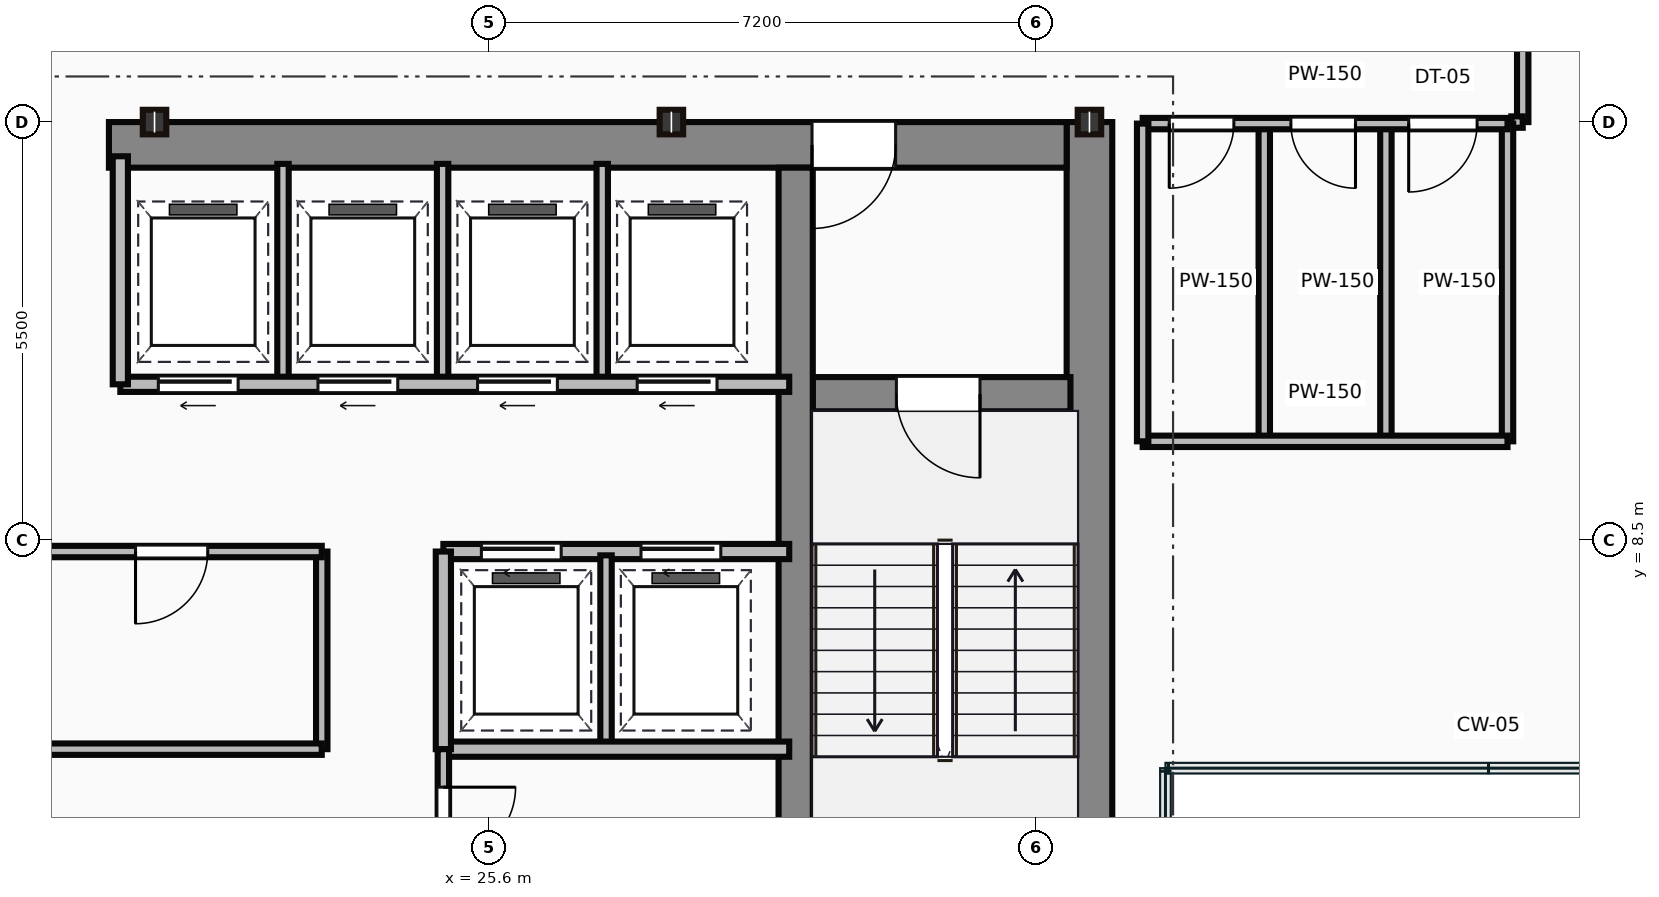
"""IFC4 building model, lengths in metres.
Left out: names, types, materials, properties, quantities, classifications, styles, units other than length and angle.
Written with IfcOpenShell. Run it as: python <this file> out.ifc"""

import sys

from ifc_helpers import new_model, si_unit, direction, frame, frame_2d, origin, origin_2d, place, context, subcontext, project, spatial, rectangle, i_section, extrude, source, transform, mapped, element, fill, save


model = new_model("IFC4")
c1 = context("Model", 3, precision=1e-05, world=origin(), true_north=direction((0.0, 1.0)))
c2 = subcontext(c1, "Body", "Model", "MODEL_VIEW")
j1 = project(units=[si_unit("LENGTHUNIT", "METRE"), si_unit("PLANEANGLEUNIT", "RADIAN")], contexts=[c1])
p1 = place(None, origin())
s1 = spatial("IfcSite", under=j1, at=p1, CompositionType="ELEMENT")
p2 = place(p1, origin())
s2 = spatial("IfcBuilding", under=s1, at=p2, CompositionType="ELEMENT")
p3 = place(p2, frame((0.0, 0.0, 280.7)))
s3 = spatial("IfcBuildingStorey", under=s2, at=p3, CompositionType="ELEMENT", Elevation=280.7)
m1 = source(origin(), c2, "Body", "SweptSolid", [
    extrude(rectangle(XDim=13.1, YDim=0.6, at=frame_2d((6.55, 0.0))), origin(), (0.0, 0.0, 1.0), 3.65),
])
p4 = place(p3, frame((33.5, 0.9, 0.0), z_axis=(0.0, 0.0, 1.0), x_axis=(0.0, 1.0, 0.0)))
e1 = element("IfcWall", 1, at=p4, inside=s3, PredefinedType="SHEAR", context=c2, shape_type="MappedRepresentation", body=[
    mapped(m1, transform((0.0, 0.0, 0.0))),
])
m2 = source(origin(), c2, "Body", "SweptSolid", [
    extrude(rectangle(XDim=12.6, YDim=0.6, at=frame_2d((6.3, 0.0))), origin(), (0.0, 0.0, 1.0), 3.65),
])
p5 = place(p3, frame((20.6, 13.7, 0.0), z_axis=(0.0, 0.0, 1.0), x_axis=(1.0, 0.0, 0.0)))
e2 = element("IfcWall", 2, at=p5, inside=s3, PredefinedType="SHEAR", context=c2, shape_type="MappedRepresentation", body=[
    mapped(m2, transform((0.0, 0.0, 0.0))),
])
p6 = place(p5, frame((9.25, 0.0, 0.0)))
e3 = element("IfcOpeningElement", 3, at=p6, cuts=e2, PredefinedType="OPENING", context=c2, shape_type="SweptSolid", body=[
    extrude(rectangle(XDim=1.1, YDim=2.15, at=frame_2d((0.55, 1.075))), frame((0.0, 0.31, 0.0), z_axis=(0.0, -1.0, 0.0), x_axis=(1.0, 0.0, 0.0)), (0.0, 0.0, 1.0), 0.62),
])
m3 = source(origin(), c2, "Body", "SweptSolid", [
    extrude(rectangle(XDim=12.5, YDim=0.45, at=frame_2d((6.25, 0.0))), origin(), (0.0, 0.0, 1.0), 3.65),
])
p7 = place(p3, frame((29.635, 0.9, 0.0), z_axis=(0.0, 0.0, 1.0), x_axis=(0.0, 1.0, 0.0)))
e4 = element("IfcWall", 4, at=p7, inside=s3, PredefinedType="SHEAR", context=c2, shape_type="MappedRepresentation", body=[
    mapped(m3, transform((0.0, 0.0, 0.0))),
])
m4 = source(origin(), c2, "Body", "SweptSolid", [
    extrude(rectangle(XDim=3.39, YDim=0.45, at=frame_2d((1.695, 0.0))), origin(), (0.0, 0.0, 1.0), 3.65),
])
p8 = place(p3, frame((29.86, 10.42, 0.0), z_axis=(0.0, 0.0, 1.0), x_axis=(1.0, 0.0, 0.0)))
e5 = element("IfcWall", 5, at=p8, inside=s3, PredefinedType="SHEAR", context=c2, shape_type="MappedRepresentation", body=[
    mapped(m4, transform((0.0, 0.0, 0.0))),
])
p9 = place(p8, frame((1.1, 0.0, 0.0)))
e6 = element("IfcOpeningElement", 6, at=p9, cuts=e5, PredefinedType="OPENING", context=c2, shape_type="SweptSolid", body=[
    extrude(rectangle(XDim=1.1, YDim=2.15, at=frame_2d((0.55, 1.075))), frame((0.0, 0.235, 0.0), z_axis=(0.0, -1.0, 0.0), x_axis=(1.0, 0.0, 0.0)), (0.0, 0.0, 1.0), 0.47),
])
m5 = source(origin(), c2, "Body", "SweptSolid", [
    extrude(i_section(OverallWidth=0.309, OverallDepth=0.323, WebThickness=0.014, FlangeThickness=0.023, at=origin_2d()), origin(), (0.0, 0.0, 1.0), 3.65),
])
for number, where, z_axis, x_axis in (
    (7, (21.2, 14.0, 0.0), (0.0, 0.0, 1.0), (1.0, 0.0, 0.0)),
    (8, (28.0, 14.0, 0.0), (0.0, 0.0, 1.0), (1.0, 0.0, 0.0)),
    (9, (33.5, 14.0, 0.0), (0.0, 0.0, 1.0), (1.0, 0.0, 0.0)),
):
    element("IfcColumn", number, at=place(p3, frame(where, z_axis=z_axis, x_axis=x_axis)), inside=s3, PredefinedType="COLUMN", context=c2, shape_type="MappedRepresentation", body=[
        mapped(m5, transform((0.0, 0.0, 0.0))),
    ])
m6 = source(origin(), c2, "Body", "SweptSolid", [
    extrude(rectangle(XDim=11.85, YDim=0.15, at=frame_2d((5.925, 0.0))), origin(), (0.0, 0.0, 1.0), 3.4),
])
p10 = place(p3, frame((11.55, 5.75, 0.0), z_axis=(0.0, 0.0, 1.0), x_axis=(1.0, 0.0, 0.0)))
e10 = element("IfcWall", 10, at=p10, inside=s3, PredefinedType="PARTITIONING", context=c2, shape_type="MappedRepresentation", body=[
    mapped(m6, transform((0.0, 0.0, 0.0))),
])
p11 = place(p3, frame((11.55, 8.35, 0.0), z_axis=(0.0, 0.0, 1.0), x_axis=(1.0, 0.0, 0.0)))
e11 = element("IfcWall", 11, at=p11, inside=s3, PredefinedType="PARTITIONING", context=c2, shape_type="MappedRepresentation", body=[
    mapped(m6, transform((0.0, 0.0, 0.0))),
])
p12 = place(p11, frame((1.1, 0.0, 0.0)))
e12 = element("IfcOpeningElement", 12, at=p12, cuts=e11, PredefinedType="OPENING", context=c2, shape_type="SweptSolid", body=[
    extrude(rectangle(XDim=0.95, YDim=2.15, at=frame_2d((0.475, 1.075))), frame((0.0, 0.085, 0.0), z_axis=(0.0, -1.0, 0.0), x_axis=(1.0, 0.0, 0.0)), (0.0, 0.0, 1.0), 0.17),
])
p13 = place(p11, frame((9.4, 0.0, 0.0)))
e13 = element("IfcOpeningElement", 13, at=p13, cuts=e11, PredefinedType="OPENING", context=c2, shape_type="SweptSolid", body=[
    extrude(rectangle(XDim=0.95, YDim=2.15, at=frame_2d((0.475, 1.075))), frame((0.0, 0.085, 0.0), z_axis=(0.0, -1.0, 0.0), x_axis=(1.0, 0.0, 0.0)), (0.0, 0.0, 1.0), 0.17),
])
m7 = source(origin(), c2, "Body", "SweptSolid", [
    extrude(rectangle(XDim=2.6, YDim=0.15, at=frame_2d((1.3, 0.0))), origin(), (0.0, 0.0, 1.0), 3.4),
])
p14 = place(p3, frame((23.4, 5.75, 0.0), z_axis=(0.0, 0.0, 1.0), x_axis=(0.0, 1.0, 0.0)))
e14 = element("IfcWall", 14, at=p14, inside=s3, PredefinedType="PARTITIONING", context=c2, shape_type="MappedRepresentation", body=[
    mapped(m7, transform((0.0, 0.0, 0.0))),
])
m8 = source(origin(), c2, "Body", "SweptSolid", [
    extrude(rectangle(XDim=8.8, YDim=0.2, at=frame_2d((4.4, 0.0))), origin(), (0.0, 0.0, 1.0), 3.4),
])
p15 = place(p3, frame((20.75, 10.55, 0.0), z_axis=(0.0, 0.0, 1.0), x_axis=(1.0, 0.0, 0.0)))
e15 = element("IfcWall", 15, at=p15, inside=s3, PredefinedType="PARTITIONING", context=c2, shape_type="MappedRepresentation", body=[
    mapped(m8, transform((0.0, 0.0, 0.0))),
])
p16 = place(p15, frame((0.5, 0.0, 0.0)))
e16 = element("IfcOpeningElement", 16, at=p16, cuts=e15, PredefinedType="OPENING", context=c2, shape_type="SweptSolid", body=[
    extrude(rectangle(XDim=1.05, YDim=2.15, at=frame_2d((0.525, 1.075))), frame((0.0, 0.11, 0.0), z_axis=(0.0, -1.0, 0.0), x_axis=(1.0, 0.0, 0.0)), (0.0, 0.0, 1.0), 0.22),
])
p17 = place(p15, frame((2.6, 0.0, 0.0)))
e17 = element("IfcOpeningElement", 17, at=p17, cuts=e15, PredefinedType="OPENING", context=c2, shape_type="SweptSolid", body=[
    extrude(rectangle(XDim=1.05, YDim=2.15, at=frame_2d((0.525, 1.075))), frame((0.0, 0.11, 0.0), z_axis=(0.0, -1.0, 0.0), x_axis=(1.0, 0.0, 0.0)), (0.0, 0.0, 1.0), 0.22),
])
p18 = place(p15, frame((4.7, 0.0, 0.0)))
e18 = element("IfcOpeningElement", 18, at=p18, cuts=e15, PredefinedType="OPENING", context=c2, shape_type="SweptSolid", body=[
    extrude(rectangle(XDim=1.05, YDim=2.15, at=frame_2d((0.525, 1.075))), frame((0.0, 0.11, 0.0), z_axis=(0.0, -1.0, 0.0), x_axis=(1.0, 0.0, 0.0)), (0.0, 0.0, 1.0), 0.22),
])
p19 = place(p15, frame((6.8, 0.0, 0.0)))
e19 = element("IfcOpeningElement", 19, at=p19, cuts=e15, PredefinedType="OPENING", context=c2, shape_type="SweptSolid", body=[
    extrude(rectangle(XDim=1.05, YDim=2.15, at=frame_2d((0.525, 1.075))), frame((0.0, 0.11, 0.0), z_axis=(0.0, -1.0, 0.0), x_axis=(1.0, 0.0, 0.0)), (0.0, 0.0, 1.0), 0.22),
])
m9 = source(origin(), c2, "Body", "SweptSolid", [
    extrude(rectangle(XDim=3.0, YDim=0.2, at=frame_2d((1.5, 0.0))), origin(), (0.0, 0.0, 1.0), 3.4),
])
p20 = place(p3, frame((20.75, 10.55, 0.0), z_axis=(0.0, 0.0, 1.0), x_axis=(0.0, 1.0, 0.0)))
e20 = element("IfcWall", 20, at=p20, inside=s3, PredefinedType="PARTITIONING", context=c2, shape_type="MappedRepresentation", body=[
    mapped(m9, transform((0.0, 0.0, 0.0))),
])
m10 = source(origin(), c2, "Body", "SweptSolid", [
    extrude(rectangle(XDim=2.85, YDim=0.15, at=frame_2d((1.425, 0.0))), origin(), (0.0, 0.0, 1.0), 3.4),
])
for number, where, z_axis, x_axis in (
    (21, (22.89, 10.6, 0.0), (0.0, 0.0, 1.0), (0.0, 1.0, 0.0)),
    (22, (24.99, 10.6, 0.0), (0.0, 0.0, 1.0), (0.0, 1.0, 0.0)),
    (23, (27.09, 10.6, 0.0), (0.0, 0.0, 1.0), (0.0, 1.0, 0.0)),
):
    element("IfcWall", number, at=place(p3, frame(where, z_axis=z_axis, x_axis=x_axis)), inside=s3, PredefinedType="PARTITIONING", context=c2, shape_type="MappedRepresentation", body=[
        mapped(m10, transform((0.0, 0.0, 0.0))),
    ])
m11 = source(origin(), c2, "Body", "SweptSolid", [
    extrude(rectangle(XDim=4.55, YDim=0.2, at=frame_2d((2.275, 0.0))), origin(), (0.0, 0.0, 1.0), 3.4),
])
p21 = place(p3, frame((25.0, 8.35, 0.0), z_axis=(0.0, 0.0, 1.0), x_axis=(1.0, 0.0, 0.0)))
e24 = element("IfcWall", 24, at=p21, inside=s3, PredefinedType="PARTITIONING", context=c2, shape_type="MappedRepresentation", body=[
    mapped(m11, transform((0.0, 0.0, 0.0))),
])
p22 = place(p21, frame((0.5, 0.0, 0.0)))
e25 = element("IfcOpeningElement", 25, at=p22, cuts=e24, PredefinedType="OPENING", context=c2, shape_type="SweptSolid", body=[
    extrude(rectangle(XDim=1.05, YDim=2.15, at=frame_2d((0.525, 1.075))), frame((0.0, 0.11, 0.0), z_axis=(0.0, -1.0, 0.0), x_axis=(1.0, 0.0, 0.0)), (0.0, 0.0, 1.0), 0.22),
])
p23 = place(p21, frame((2.6, 0.0, 0.0)))
e26 = element("IfcOpeningElement", 26, at=p23, cuts=e24, PredefinedType="OPENING", context=c2, shape_type="SweptSolid", body=[
    extrude(rectangle(XDim=1.05, YDim=2.15, at=frame_2d((0.525, 1.075))), frame((0.0, 0.11, 0.0), z_axis=(0.0, -1.0, 0.0), x_axis=(1.0, 0.0, 0.0)), (0.0, 0.0, 1.0), 0.22),
])
p24 = place(p3, frame((25.0, 5.75, 0.0), z_axis=(0.0, 0.0, 1.0), x_axis=(1.0, 0.0, 0.0)))
e27 = element("IfcWall", 27, at=p24, inside=s3, PredefinedType="PARTITIONING", context=c2, shape_type="MappedRepresentation", body=[
    mapped(m11, transform((0.0, 0.0, 0.0))),
])
m12 = source(origin(), c2, "Body", "SweptSolid", [
    extrude(rectangle(XDim=2.6, YDim=0.2, at=frame_2d((1.3, 0.0))), origin(), (0.0, 0.0, 1.0), 3.4),
])
p25 = place(p3, frame((25.0, 5.75, 0.0), z_axis=(0.0, 0.0, 1.0), x_axis=(0.0, 1.0, 0.0)))
e28 = element("IfcWall", 28, at=p25, inside=s3, PredefinedType="PARTITIONING", context=c2, shape_type="MappedRepresentation", body=[
    mapped(m12, transform((0.0, 0.0, 0.0))),
])
m13 = source(origin(), c2, "Body", "SweptSolid", [
    extrude(rectangle(XDim=2.5, YDim=0.15, at=frame_2d((1.25, 0.0))), origin(), (0.0, 0.0, 1.0), 3.4),
])
p26 = place(p3, frame((27.14, 5.8, 0.0), z_axis=(0.0, 0.0, 1.0), x_axis=(0.0, 1.0, 0.0)))
e29 = element("IfcWall", 29, at=p26, inside=s3, PredefinedType="PARTITIONING", context=c2, shape_type="MappedRepresentation", body=[
    mapped(m13, transform((0.0, 0.0, 0.0))),
])
m14 = source(origin(), c2, "Body", "SweptSolid", [
    extrude(rectangle(XDim=4.9, YDim=0.15, at=frame_2d((2.45, 0.0))), origin(), (0.0, 0.0, 1.0), 3.4),
])
p27 = place(p3, frame((25.0, 0.85, 0.0), z_axis=(0.0, 0.0, 1.0), x_axis=(0.0, 1.0, 0.0)))
e30 = element("IfcWall", 30, at=p27, inside=s3, PredefinedType="PARTITIONING", context=c2, shape_type="MappedRepresentation", body=[
    mapped(m14, transform((0.0, 0.0, 0.0))),
])
p28 = place(p27, frame((1.8, 0.0, 0.0)))
e31 = element("IfcOpeningElement", 31, at=p28, cuts=e30, PredefinedType="OPENING", context=c2, shape_type="SweptSolid", body=[
    extrude(rectangle(XDim=0.95, YDim=2.15, at=frame_2d((0.475, 1.075))), frame((0.0, 0.085, 0.0), z_axis=(0.0, -1.0, 0.0), x_axis=(1.0, 0.0, 0.0)), (0.0, 0.0, 1.0), 0.17),
])
p29 = place(p27, frame((3.45, 0.0, 0.0)))
e32 = element("IfcOpeningElement", 32, at=p29, cuts=e30, PredefinedType="OPENING", context=c2, shape_type="SweptSolid", body=[
    extrude(rectangle(XDim=0.95, YDim=2.15, at=frame_2d((0.475, 1.075))), frame((0.0, 0.085, 0.0), z_axis=(0.0, -1.0, 0.0), x_axis=(1.0, 0.0, 0.0)), (0.0, 0.0, 1.0), 0.17),
])
m15 = source(origin(), c2, "Body", "SweptSolid", [
    extrude(rectangle(XDim=4.8, YDim=0.15, at=frame_2d((2.4, 0.0))), origin(), (0.0, 0.0, 1.0), 2.787),
])
p30 = place(p3, frame((34.2, 13.98, 0.0), z_axis=(0.0, 0.0, 1.0), x_axis=(1.0, 0.0, 0.0)))
e33 = element("IfcWall", 33, at=p30, inside=s3, PredefinedType="PARTITIONING", context=c2, shape_type="MappedRepresentation", body=[
    mapped(m15, transform((0.0, 0.0, 0.0))),
])
p31 = place(p30, frame((0.35, 0.0, 0.0)))
e34 = element("IfcOpeningElement", 34, at=p31, cuts=e33, PredefinedType="OPENING", context=c2, shape_type="SweptSolid", body=[
    extrude(rectangle(XDim=0.85, YDim=2.1, at=frame_2d((0.425, 1.05))), frame((0.0, 0.085, 0.0), z_axis=(0.0, -1.0, 0.0), x_axis=(1.0, 0.0, 0.0)), (0.0, 0.0, 1.0), 0.17),
])
p32 = place(p30, frame((1.95, 0.0, 0.0)))
e35 = element("IfcOpeningElement", 35, at=p32, cuts=e33, PredefinedType="OPENING", context=c2, shape_type="SweptSolid", body=[
    extrude(rectangle(XDim=0.85, YDim=2.1, at=frame_2d((0.425, 1.05))), frame((0.0, 0.085, 0.0), z_axis=(0.0, -1.0, 0.0), x_axis=(1.0, 0.0, 0.0)), (0.0, 0.0, 1.0), 0.17),
])
p33 = place(p30, frame((3.5, 0.0, 0.0)))
e36 = element("IfcOpeningElement", 36, at=p33, cuts=e33, PredefinedType="OPENING", context=c2, shape_type="SweptSolid", body=[
    extrude(rectangle(XDim=0.9, YDim=2.1, at=frame_2d((0.45, 1.05))), frame((0.0, 0.085, 0.0), z_axis=(0.0, -1.0, 0.0), x_axis=(1.0, 0.0, 0.0)), (0.0, 0.0, 1.0), 0.17),
])
m16 = source(origin(), c2, "Body", "SweptSolid", [
    extrude(rectangle(XDim=4.8, YDim=0.15, at=frame_2d((2.4, 0.0))), origin(), (0.0, 0.0, 1.0), 3.4),
])
p34 = place(p3, frame((34.2, 9.8, 0.0), z_axis=(0.0, 0.0, 1.0), x_axis=(1.0, 0.0, 0.0)))
e37 = element("IfcWall", 37, at=p34, inside=s3, PredefinedType="PARTITIONING", context=c2, shape_type="MappedRepresentation", body=[
    mapped(m16, transform((0.0, 0.0, 0.0))),
])
m17 = source(origin(), c2, "Body", "SweptSolid", [
    extrude(rectangle(XDim=4.18, YDim=0.15, at=frame_2d((2.09, 0.0))), origin(), (0.0, 0.0, 1.0), 3.4),
])
for number, where, z_axis, x_axis in (
    (38, (39.0, 9.8, 0.0), (0.0, 0.0, 1.0), (0.0, 1.0, 0.0)),
    (39, (34.2, 9.8, 0.0), (0.0, 0.0, 1.0), (0.0, 1.0, 0.0)),
    (40, (35.8, 9.8, 0.0), (0.0, 0.0, 1.0), (0.0, 1.0, 0.0)),
    (41, (37.4, 9.8, 0.0), (0.0, 0.0, 1.0), (0.0, 1.0, 0.0)),
):
    element("IfcWall", number, at=place(p3, frame(where, z_axis=z_axis, x_axis=x_axis)), inside=s3, PredefinedType="PARTITIONING", context=c2, shape_type="MappedRepresentation", body=[
        mapped(m17, transform((0.0, 0.0, 0.0))),
    ])
m18 = source(origin(), c2, "Body", "SweptSolid", [
    extrude(rectangle(XDim=2.2, YDim=0.15, at=frame_2d((1.1, 0.0))), origin(), (0.0, 0.0, 1.0), 3.4),
])
p35 = place(p3, frame((39.2, 16.2, 0.0), z_axis=(0.0, 0.0, 1.0), x_axis=(0.0, -1.0, 0.0)))
e42 = element("IfcWall", 42, at=p35, inside=s3, PredefinedType="PARTITIONING", context=c2, shape_type="MappedRepresentation", body=[
    mapped(m18, transform((0.0, 0.0, 0.0))),
])
m19 = source(origin(), c2, "Body", "SweptSolid", [
    extrude(rectangle(XDim=0.15, YDim=0.15, at=frame_2d((0.075, 0.0))), origin(), (0.0, 0.0, 1.0), 3.4),
])
p36 = place(p3, frame((39.2, 14.0, 0.0), z_axis=(0.0, 0.0, 1.0), x_axis=(-1.0, 0.0, 0.0)))
e43 = element("IfcWall", 43, at=p36, inside=s3, PredefinedType="PARTITIONING", context=c2, shape_type="MappedRepresentation", body=[
    mapped(m19, transform((0.0, 0.0, 0.0))),
])
m20 = source(origin(), c2, "Body", "SweptSolid", [
    extrude(rectangle(XDim=1.1, YDim=2.15, at=frame_2d((0.55, 1.075))), frame((0.0, 0.025, 0.0), z_axis=(0.0, -1.0, 0.0), x_axis=(1.0, 0.0, 0.0)), (0.0, 0.0, 1.0), 0.05),
])
p37 = place(p9, frame((1.1, 0.0, 0.0), z_axis=(0.0, 0.0, 1.0), x_axis=(-1.0, 0.0, 0.0)))
e44 = element("IfcDoor", 44, at=p37, inside=s3, OperationType="SINGLE_SWING_RIGHT", PredefinedType="DOOR", context=c2, shape_type="MappedRepresentation", body=[
    mapped(m20, transform((0.0, 0.0, 0.0))),
])
fill(e6, e44)
p38 = place(p6, origin())
e45 = element("IfcDoor", 45, at=p38, inside=s3, OperationType="SINGLE_SWING_LEFT", PredefinedType="DOOR", context=c2, shape_type="MappedRepresentation", body=[
    mapped(m20, transform((0.0, 0.0, 0.0))),
])
fill(e3, e45)
m21 = source(origin(), c2, "Body", "SweptSolid", [
    extrude(rectangle(XDim=0.95, YDim=2.15, at=frame_2d((0.475, 1.075))), frame((0.0, 0.025, 0.0), z_axis=(0.0, -1.0, 0.0), x_axis=(1.0, 0.0, 0.0)), (0.0, 0.0, 1.0), 0.05),
])
p39 = place(p13, origin())
e46 = element("IfcDoor", 46, at=p39, inside=s3, OperationType="SINGLE_SWING_LEFT", PredefinedType="DOOR", context=c2, shape_type="MappedRepresentation", body=[
    mapped(m21, transform((0.0, 0.0, 0.0))),
])
fill(e13, e46)
m22 = source(origin(), c2, "Body", "SweptSolid", [
    extrude(rectangle(XDim=1.05, YDim=2.15, at=frame_2d((0.525, 1.075))), frame((0.0, 0.025, 0.0), z_axis=(0.0, -1.0, 0.0), x_axis=(1.0, 0.0, 0.0)), (0.0, 0.0, 1.0), 0.05),
])
p40 = place(p16, frame((1.05, 0.0, 0.0), z_axis=(0.0, 0.0, 1.0), x_axis=(-1.0, 0.0, 0.0)))
e47 = element("IfcDoor", 47, at=p40, inside=s3, OperationType="SLIDING_TO_LEFT", PredefinedType="DOOR", context=c2, shape_type="MappedRepresentation", body=[
    mapped(m22, transform((0.0, 0.0, 0.0))),
])
fill(e16, e47)
p41 = place(p17, frame((1.05, 0.0, 0.0), z_axis=(0.0, 0.0, 1.0), x_axis=(-1.0, 0.0, 0.0)))
e48 = element("IfcDoor", 48, at=p41, inside=s3, OperationType="SLIDING_TO_LEFT", PredefinedType="DOOR", context=c2, shape_type="MappedRepresentation", body=[
    mapped(m22, transform((0.0, 0.0, 0.0))),
])
fill(e17, e48)
p42 = place(p18, frame((1.05, 0.0, 0.0), z_axis=(0.0, 0.0, 1.0), x_axis=(-1.0, 0.0, 0.0)))
e49 = element("IfcDoor", 49, at=p42, inside=s3, OperationType="SLIDING_TO_LEFT", PredefinedType="DOOR", context=c2, shape_type="MappedRepresentation", body=[
    mapped(m22, transform((0.0, 0.0, 0.0))),
])
fill(e18, e49)
p43 = place(p19, frame((1.05, 0.0, 0.0), z_axis=(0.0, 0.0, 1.0), x_axis=(-1.0, 0.0, 0.0)))
e50 = element("IfcDoor", 50, at=p43, inside=s3, OperationType="SLIDING_TO_LEFT", PredefinedType="DOOR", context=c2, shape_type="MappedRepresentation", body=[
    mapped(m22, transform((0.0, 0.0, 0.0))),
])
fill(e19, e50)
p44 = place(p22, origin())
e51 = element("IfcDoor", 51, at=p44, inside=s3, OperationType="SLIDING_TO_LEFT", PredefinedType="DOOR", context=c2, shape_type="MappedRepresentation", body=[
    mapped(m22, transform((0.0, 0.0, 0.0))),
])
fill(e25, e51)
p45 = place(p23, origin())
e52 = element("IfcDoor", 52, at=p45, inside=s3, OperationType="SLIDING_TO_LEFT", PredefinedType="DOOR", context=c2, shape_type="MappedRepresentation", body=[
    mapped(m22, transform((0.0, 0.0, 0.0))),
])
fill(e26, e52)
p46 = place(p29, origin())
e53 = element("IfcDoor", 53, at=p46, inside=s3, OperationType="SINGLE_SWING_RIGHT", PredefinedType="DOOR", context=c2, shape_type="MappedRepresentation", body=[
    mapped(m21, transform((0.0, 0.0, 0.0))),
])
fill(e32, e53)
m23 = source(origin(), c2, "Body", "SweptSolid", [
    extrude(rectangle(XDim=0.85, YDim=2.1, at=frame_2d((0.425, 1.05))), frame((0.0, 0.025, 0.0), z_axis=(0.0, -1.0, 0.0), x_axis=(1.0, 0.0, 0.0)), (0.0, 0.0, 1.0), 0.05),
])
p47 = place(p31, frame((0.85, 0.0, 0.0), z_axis=(0.0, 0.0, 1.0), x_axis=(-1.0, 0.0, 0.0)))
e54 = element("IfcDoor", 54, at=p47, inside=s3, OperationType="SINGLE_SWING_LEFT", PredefinedType="DOOR", context=c2, shape_type="MappedRepresentation", body=[
    mapped(m23, transform((0.0, 0.0, 0.0))),
])
fill(e34, e54)
p48 = place(p32, frame((0.85, 0.0, 0.0), z_axis=(0.0, 0.0, 1.0), x_axis=(-1.0, 0.0, 0.0)))
e55 = element("IfcDoor", 55, at=p48, inside=s3, OperationType="SINGLE_SWING_RIGHT", PredefinedType="DOOR", context=c2, shape_type="MappedRepresentation", body=[
    mapped(m23, transform((0.0, 0.0, 0.0))),
])
fill(e35, e55)
m24 = source(origin(), c2, "Body", "SweptSolid", [
    extrude(rectangle(XDim=0.9, YDim=2.1, at=frame_2d((0.45, 1.05))), frame((0.0, 0.025, 0.0), z_axis=(0.0, -1.0, 0.0), x_axis=(1.0, 0.0, 0.0)), (0.0, 0.0, 1.0), 0.05),
])
p49 = place(p33, frame((0.9, 0.0, 0.0), z_axis=(0.0, 0.0, 1.0), x_axis=(-1.0, 0.0, 0.0)))
e56 = element("IfcDoor", 56, at=p49, inside=s3, OperationType="SINGLE_SWING_LEFT", PredefinedType="DOOR", context=c2, shape_type="MappedRepresentation", body=[
    mapped(m24, transform((0.0, 0.0, 0.0))),
])
fill(e36, e56)
save(model, sys.argv[1])
